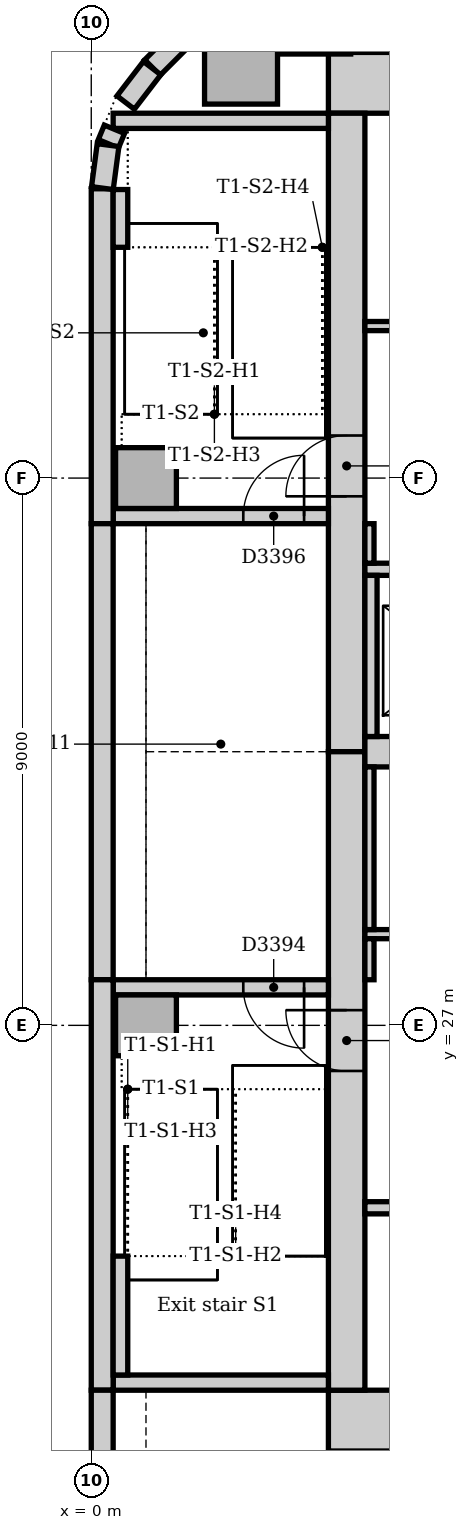
"""IFC4 building model, lengths in metres.
Left out: names, types, materials, properties, quantities, classifications, styles, units other than length and angle.
Written with IfcOpenShell. Run it as: python <this file> out.ifc"""

import sys

from ifc_helpers import new_model, si_unit, direction, frame, frame_2d, origin, origin_2d, place, context, subcontext, project, spatial, rectangle, extrude, element, fill, save


model = new_model("IFC4")
c1 = context("Model", 3, precision=1e-05, world=origin(), true_north=direction((0.0, 1.0)))
c2 = subcontext(c1, "Body", "Model", "MODEL_VIEW")
j1 = project(units=[si_unit("LENGTHUNIT", "METRE"), si_unit("PLANEANGLEUNIT", "RADIAN")], contexts=[c1])
p1 = place(None, origin())
s1 = spatial("IfcSite", under=j1, at=p1, CompositionType="ELEMENT")
p2 = place(p1, origin())
s2 = spatial("IfcBuilding", under=s1, at=p2, CompositionType="ELEMENT")
p3 = place(p2, frame((0.0, 0.0, 46.0)))
s3 = spatial("IfcBuildingStorey", under=s2, at=p3, CompositionType="ELEMENT", Elevation=46.0)
for number, where, z_axis, x_axis in (
    (1, (3.9, 20.5, 0.0), (0.0, 0.0, 1.0), (1.0, 0.0, 0.0)),
    (2, (23.5, 42.5, 0.0), (0.0, 0.0, 1.0), (-1.0, 0.0, 0.0)),
):
    element("IfcWall", number, at=place(p3, frame(where, z_axis=z_axis, x_axis=x_axis)), inside=s3, PredefinedType="SOLIDWALL", context=c2, shape_type="SweptSolid", body=[
        extrude(rectangle(XDim=19.6, YDim=1.0, at=frame_2d((9.8, 0.0))), origin(), (0.0, 0.0, 1.0), 5.0),
    ])
p4 = place(p3, frame((4.2, 42.0, 0.0), z_axis=(0.0, 0.0, 1.0), x_axis=(0.0, -1.0, 0.0)))
e3 = element("IfcWall", 3, at=p4, inside=s3, PredefinedType="SOLIDWALL", context=c2, shape_type="SweptSolid", body=[
    extrude(rectangle(XDim=10.5, YDim=0.6, at=frame_2d((5.25, 0.0))), origin(), (0.0, 0.0, 1.0), 5.0),
])
p5 = place(p4, frame((5.3, 0.0, 0.0)))
e4 = element("IfcOpeningElement", 4, at=p5, cuts=e3, PredefinedType="OPENING", context=c2, shape_type="SweptSolid", body=[
    extrude(rectangle(XDim=1.0, YDim=2.1, at=frame_2d((0.5, 1.05))), frame((0.0, 0.31, 0.0), z_axis=(0.0, -1.0, 0.0), x_axis=(1.0, 0.0, 0.0)), (0.0, 0.0, 1.0), 0.62),
])
p6 = place(p3, frame((4.2, 31.5, 0.0), z_axis=(0.0, 0.0, 1.0), x_axis=(0.0, -1.0, 0.0)))
e5 = element("IfcWall", 5, at=p6, inside=s3, PredefinedType="SOLIDWALL", context=c2, shape_type="SweptSolid", body=[
    extrude(rectangle(XDim=10.5, YDim=0.6, at=frame_2d((5.25, 0.0))), origin(), (0.0, 0.0, 1.0), 5.0),
])
p7 = place(p6, frame((4.25, 0.0, 0.0)))
e6 = element("IfcOpeningElement", 6, at=p7, cuts=e5, PredefinedType="OPENING", context=c2, shape_type="SweptSolid", body=[
    extrude(rectangle(XDim=1.0, YDim=2.1, at=frame_2d((0.5, 1.05))), frame((0.0, 0.31, 0.0), z_axis=(0.0, -1.0, 0.0), x_axis=(1.0, 0.0, 0.0)), (0.0, 0.0, 1.0), 0.62),
])
p8 = place(p3, frame((4.5, 31.5, 0.0), z_axis=(0.0, 0.0, 1.0), x_axis=(1.0, 0.0, 0.0)))
e7 = element("IfcWall", 7, at=p8, inside=s3, PredefinedType="SOLIDWALL", context=c2, shape_type="SweptSolid", body=[
    extrude(rectangle(XDim=18.0, YDim=0.5, at=frame_2d((9.0, 0.0))), origin(), (0.0, 0.0, 1.0), 5.0),
])
p9 = place(p3, frame((0.36, 21.125, 0.0), z_axis=(0.0, 0.0, 1.0), x_axis=(1.0, 0.0, 0.0)))
e8 = element("IfcWall", 8, at=p9, inside=s3, PredefinedType="SOLIDWALL", context=c2, shape_type="SweptSolid", body=[
    extrude(rectangle(XDim=3.54, YDim=0.25, at=frame_2d((1.77, 0.0))), origin(), (0.0, 0.0, 1.0), 5.0),
])
p10 = place(p3, frame((3.9, 27.625, 0.0), z_axis=(0.0, 0.0, 1.0), x_axis=(-1.0, 0.0, 0.0)))
e9 = element("IfcWall", 9, at=p10, inside=s3, PredefinedType="SOLIDWALL", context=c2, shape_type="SweptSolid", body=[
    extrude(rectangle(XDim=3.54, YDim=0.25, at=frame_2d((1.77, 0.0))), origin(), (0.0, 0.0, 1.0), 5.0),
])
p11 = place(p10, frame((0.4, 0.0, 0.0)))
e10 = element("IfcOpeningElement", 10, at=p11, cuts=e9, PredefinedType="OPENING", context=c2, shape_type="SweptSolid", body=[
    extrude(rectangle(XDim=1.0, YDim=2.1, at=frame_2d((0.5, 1.05))), frame((0.0, 0.135, 0.0), z_axis=(0.0, -1.0, 0.0), x_axis=(1.0, 0.0, 0.0)), (0.0, 0.0, 1.0), 0.27),
])
p12 = place(p3, frame((0.36, 35.375, 0.0), z_axis=(0.0, 0.0, 1.0), x_axis=(1.0, 0.0, 0.0)))
e11 = element("IfcWall", 11, at=p12, inside=s3, PredefinedType="SOLIDWALL", context=c2, shape_type="SweptSolid", body=[
    extrude(rectangle(XDim=3.54, YDim=0.25, at=frame_2d((1.77, 0.0))), origin(), (0.0, 0.0, 1.0), 5.0),
])
p13 = place(p12, frame((2.14, 0.0, 0.0)))
e12 = element("IfcOpeningElement", 12, at=p13, cuts=e11, PredefinedType="OPENING", context=c2, shape_type="SweptSolid", body=[
    extrude(rectangle(XDim=1.0, YDim=2.1, at=frame_2d((0.5, 1.05))), frame((0.0, 0.135, 0.0), z_axis=(0.0, -1.0, 0.0), x_axis=(1.0, 0.0, 0.0)), (0.0, 0.0, 1.0), 0.27),
])
p14 = place(p3, frame((3.9, 41.875, 0.0), z_axis=(0.0, 0.0, 1.0), x_axis=(-1.0, 0.0, 0.0)))
e13 = element("IfcWall", 13, at=p14, inside=s3, PredefinedType="SOLIDWALL", context=c2, shape_type="SweptSolid", body=[
    extrude(rectangle(XDim=3.54, YDim=0.25, at=frame_2d((1.77, 0.0))), origin(), (0.0, 0.0, 1.0), 5.0),
])
for number, where, z_axis, x_axis in (
    (14, (3.667, 43.574, 0.0), (0.0, 0.0, 1.0), (1.0, 0.0, 0.0)),
    (15, (2.463, 42.75, 0.0), (0.0, 0.0, 1.0), (1.0, 0.0, 0.0)),
):
    element("IfcColumn", number, at=place(p3, frame(where, z_axis=z_axis, x_axis=x_axis)), inside=s3, PredefinedType="COLUMN", context=c2, shape_type="SweptSolid", body=[
        extrude(rectangle(XDim=1.2, YDim=1.2, at=origin_2d()), origin(), (0.0, 0.0, 1.0), 4.85),
    ])
for number, where, z_axis, x_axis in (
    (16, (0.9, 27.0, 0.0), (0.0, 0.0, 1.0), (1.0, 0.0, 0.0)),
    (17, (0.9, 36.0, 0.0), (0.0, 0.0, 1.0), (1.0, 0.0, 0.0)),
):
    element("IfcColumn", number, at=place(p3, frame(where, z_axis=z_axis, x_axis=x_axis)), inside=s3, PredefinedType="COLUMN", context=c2, shape_type="SweptSolid", body=[
        extrude(rectangle(XDim=1.0, YDim=1.0, at=origin_2d()), origin(), (0.0, 0.0, 1.0), 5.0),
    ])
p15 = place(p3, frame((2.249, 43.994, 0.0), z_axis=(0.0, 0.0, 1.0), x_axis=(-0.707106781187, -0.707106781187, 0.0)))
e18 = element("IfcWall", 18, at=p15, inside=s3, PredefinedType="STANDARD", context=c2, shape_type="SweptSolid", body=[
    extrude(rectangle(XDim=1.757, YDim=0.36, at=frame_2d((0.879, 0.0))), origin(), (0.0, 0.0, 1.0), 4.85),
])
p16 = place(p3, frame((0.18, 40.757, 0.0), z_axis=(0.0, 0.0, 1.0), x_axis=(0.0, -1.0, 0.0)))
e19 = element("IfcWall", 19, at=p16, inside=s3, PredefinedType="STANDARD", context=c2, shape_type="SweptSolid", body=[
    extrude(rectangle(XDim=5.507, YDim=0.36, at=frame_2d((2.754, 0.0))), origin(), (0.0, 0.0, 1.0), 4.85),
])
p17 = place(p3, frame((0.18, 35.25, 0.0), z_axis=(0.0, 0.0, 1.0), x_axis=(0.0, -1.0, 0.0)))
e20 = element("IfcWall", 20, at=p17, inside=s3, PredefinedType="STANDARD", context=c2, shape_type="SweptSolid", body=[
    extrude(rectangle(XDim=7.5, YDim=0.36, at=frame_2d((3.75, 0.0))), origin(), (0.0, 0.0, 1.0), 4.85),
])
p18 = place(p3, frame((0.18, 27.75, 0.0), z_axis=(0.0, 0.0, 1.0), x_axis=(0.0, -1.0, 0.0)))
e21 = element("IfcWall", 21, at=p18, inside=s3, PredefinedType="STANDARD", context=c2, shape_type="SweptSolid", body=[
    extrude(rectangle(XDim=6.75, YDim=0.36, at=frame_2d((3.375, 0.0))), origin(), (0.0, 0.0, 1.0), 4.85),
])
p19 = place(p3, frame((0.18, 21.0, 0.0), z_axis=(0.0, 0.0, 1.0), x_axis=(0.0, -1.0, 0.0)))
e22 = element("IfcWall", 22, at=p19, inside=s3, PredefinedType="STANDARD", context=c2, shape_type="SweptSolid", body=[
    extrude(rectangle(XDim=16.757, YDim=0.36, at=frame_2d((8.379, 0.0))), origin(), (0.0, 0.0, 1.0), 4.85),
])
p20 = place(p19, frame((1.35, 0.0, 0.9)))
e23 = element("IfcOpeningElement", 23, at=p20, cuts=e22, PredefinedType="OPENING", context=c2, shape_type="SweptSolid", body=[
    extrude(rectangle(XDim=3.3, YDim=2.2, at=frame_2d((1.65, 1.1))), frame((0.0, 0.19, 0.0), z_axis=(0.0, -1.0, 0.0), x_axis=(1.0, 0.0, 0.0)), (0.0, 0.0, 1.0), 0.38),
])
p21 = place(p19, frame((5.85, 0.0, 0.9)))
e24 = element("IfcOpeningElement", 24, at=p21, cuts=e22, PredefinedType="OPENING", context=c2, shape_type="SweptSolid", body=[
    extrude(rectangle(XDim=3.3, YDim=2.2, at=frame_2d((1.65, 1.1))), frame((0.0, 0.19, 0.0), z_axis=(0.0, -1.0, 0.0), x_axis=(1.0, 0.0, 0.0)), (0.0, 0.0, 1.0), 0.38),
])
p22 = place(p19, frame((10.35, 0.0, 0.9)))
e25 = element("IfcOpeningElement", 25, at=p22, cuts=e22, PredefinedType="OPENING", context=c2, shape_type="SweptSolid", body=[
    extrude(rectangle(XDim=3.3, YDim=2.2, at=frame_2d((1.65, 1.1))), frame((0.0, 0.19, 0.0), z_axis=(0.0, -1.0, 0.0), x_axis=(1.0, 0.0, 0.0)), (0.0, 0.0, 1.0), 0.38),
])
p23 = place(p3, frame((1.0, 42.741, 0.0), z_axis=(0.0, 0.0, 1.0), x_axis=(-0.608802368033, -0.793321924995, 0.0)))
e26 = element("IfcWall", 26, at=p23, inside=s3, PredefinedType="STANDARD", context=c2, shape_type="SweptSolid", body=[
    extrude(rectangle(XDim=0.713, YDim=0.36, at=frame_2d((0.357, 0.0))), origin(), (0.0, 0.0, 1.0), 4.85),
])
p24 = place(p3, frame((0.381, 41.736, 0.0), z_axis=(0.0, 0.0, 1.0), x_axis=(-0.382773360986, -0.923842277729, 0.0)))
e27 = element("IfcWall", 27, at=p24, inside=s3, PredefinedType="STANDARD", context=c2, shape_type="SweptSolid", body=[
    extrude(rectangle(XDim=0.258, YDim=0.36, at=frame_2d((0.129, 0.0))), origin(), (0.0, 0.0, 1.0), 4.85),
])
p25 = place(p3, frame((0.276, 41.476, 0.0), z_axis=(0.0, 0.0, 1.0), x_axis=(-0.13055608231, -0.99144092581, 0.0)))
e28 = element("IfcWall", 28, at=p25, inside=s3, PredefinedType="STANDARD", context=c2, shape_type="SweptSolid", body=[
    extrude(rectangle(XDim=0.713, YDim=0.36, at=frame_2d((0.356, 0.0))), origin(), (0.0, 0.0, 1.0), 4.85),
])
p26 = place(p3, frame((0.48, 21.25, 0.0), z_axis=(0.0, 0.0, 1.0), x_axis=(0.0, 1.0, 0.0)))
e29 = element("IfcWall", 29, at=p26, inside=s3, PredefinedType="STANDARD", context=c2, shape_type="SweptSolid", body=[
    extrude(rectangle(XDim=1.955, YDim=0.24, at=frame_2d((0.978, 0.0))), origin(), (0.0, 0.0, 1.0), 5.0),
])
p27 = place(p3, frame((0.48, 39.795, 0.0), z_axis=(0.0, 0.0, 1.0), x_axis=(0.0, 1.0, 0.0)))
e30 = element("IfcWall", 30, at=p27, inside=s3, PredefinedType="STANDARD", context=c2, shape_type="SweptSolid", body=[
    extrude(rectangle(XDim=0.95, YDim=0.24, at=frame_2d((0.475, 0.0))), origin(), (0.0, 0.0, 1.0), 5.0),
])
p28 = place(p3, frame((4.5, 24.0, 0.0), z_axis=(0.0, 0.0, 1.0), x_axis=(1.0, 0.0, 0.0)))
e31 = element("IfcWall", 31, at=p28, inside=s3, PredefinedType="PARTITIONING", context=c2, shape_type="SweptSolid", body=[
    extrude(rectangle(XDim=18.0, YDim=0.2, at=frame_2d((9.0, 0.0))), origin(), (0.0, 0.0, 1.0), 4.85),
])
p29 = place(p28, frame((0.95, 0.0, 0.0)))
e32 = element("IfcOpeningElement", 32, at=p29, cuts=e31, PredefinedType="OPENING", context=c2, shape_type="SweptSolid", body=[
    extrude(rectangle(XDim=1.1, YDim=2.1, at=frame_2d((0.55, 1.05))), frame((0.0, 0.11, 0.0), z_axis=(0.0, -1.0, 0.0), x_axis=(1.0, 0.0, 0.0)), (0.0, 0.0, 1.0), 0.22),
])
p30 = place(p28, frame((3.95, 0.0, 0.0)))
e33 = element("IfcOpeningElement", 33, at=p30, cuts=e31, PredefinedType="OPENING", context=c2, shape_type="SweptSolid", body=[
    extrude(rectangle(XDim=1.1, YDim=2.1, at=frame_2d((0.55, 1.05))), frame((0.0, 0.11, 0.0), z_axis=(0.0, -1.0, 0.0), x_axis=(1.0, 0.0, 0.0)), (0.0, 0.0, 1.0), 0.22),
])
p31 = place(p28, frame((6.95, 0.0, 0.0)))
e34 = element("IfcOpeningElement", 34, at=p31, cuts=e31, PredefinedType="OPENING", context=c2, shape_type="SweptSolid", body=[
    extrude(rectangle(XDim=1.1, YDim=2.1, at=frame_2d((0.55, 1.05))), frame((0.0, 0.11, 0.0), z_axis=(0.0, -1.0, 0.0), x_axis=(1.0, 0.0, 0.0)), (0.0, 0.0, 1.0), 0.22),
])
p32 = place(p28, frame((9.95, 0.0, 0.0)))
e35 = element("IfcOpeningElement", 35, at=p32, cuts=e31, PredefinedType="OPENING", context=c2, shape_type="SweptSolid", body=[
    extrude(rectangle(XDim=1.1, YDim=2.1, at=frame_2d((0.55, 1.05))), frame((0.0, 0.11, 0.0), z_axis=(0.0, -1.0, 0.0), x_axis=(1.0, 0.0, 0.0)), (0.0, 0.0, 1.0), 0.22),
])
p33 = place(p28, frame((12.95, 0.0, 0.0)))
e36 = element("IfcOpeningElement", 36, at=p33, cuts=e31, PredefinedType="OPENING", context=c2, shape_type="SweptSolid", body=[
    extrude(rectangle(XDim=1.1, YDim=2.1, at=frame_2d((0.55, 1.05))), frame((0.0, 0.11, 0.0), z_axis=(0.0, -1.0, 0.0), x_axis=(1.0, 0.0, 0.0)), (0.0, 0.0, 1.0), 0.22),
])
p34 = place(p28, frame((15.95, 0.0, 0.0)))
e37 = element("IfcOpeningElement", 37, at=p34, cuts=e31, PredefinedType="OPENING", context=c2, shape_type="SweptSolid", body=[
    extrude(rectangle(XDim=1.1, YDim=2.1, at=frame_2d((0.55, 1.05))), frame((0.0, 0.11, 0.0), z_axis=(0.0, -1.0, 0.0), x_axis=(1.0, 0.0, 0.0)), (0.0, 0.0, 1.0), 0.22),
])
p35 = place(p3, frame((4.5, 34.5, 0.0), z_axis=(0.0, 0.0, 1.0), x_axis=(1.0, 0.0, 0.0)))
e38 = element("IfcWall", 38, at=p35, inside=s3, PredefinedType="PARTITIONING", context=c2, shape_type="SweptSolid", body=[
    extrude(rectangle(XDim=18.0, YDim=0.2, at=frame_2d((9.0, 0.0))), origin(), (0.0, 0.0, 1.0), 4.85),
])
p36 = place(p35, frame((0.95, 0.0, 0.0)))
e39 = element("IfcOpeningElement", 39, at=p36, cuts=e38, PredefinedType="OPENING", context=c2, shape_type="SweptSolid", body=[
    extrude(rectangle(XDim=1.1, YDim=2.1, at=frame_2d((0.55, 1.05))), frame((0.0, 0.11, 0.0), z_axis=(0.0, -1.0, 0.0), x_axis=(1.0, 0.0, 0.0)), (0.0, 0.0, 1.0), 0.22),
])
p37 = place(p35, frame((3.95, 0.0, 0.0)))
e40 = element("IfcOpeningElement", 40, at=p37, cuts=e38, PredefinedType="OPENING", context=c2, shape_type="SweptSolid", body=[
    extrude(rectangle(XDim=1.1, YDim=2.1, at=frame_2d((0.55, 1.05))), frame((0.0, 0.11, 0.0), z_axis=(0.0, -1.0, 0.0), x_axis=(1.0, 0.0, 0.0)), (0.0, 0.0, 1.0), 0.22),
])
p38 = place(p35, frame((12.95, 0.0, 0.0)))
e41 = element("IfcOpeningElement", 41, at=p38, cuts=e38, PredefinedType="OPENING", context=c2, shape_type="SweptSolid", body=[
    extrude(rectangle(XDim=1.1, YDim=2.1, at=frame_2d((0.55, 1.05))), frame((0.0, 0.11, 0.0), z_axis=(0.0, -1.0, 0.0), x_axis=(1.0, 0.0, 0.0)), (0.0, 0.0, 1.0), 0.22),
])
p39 = place(p35, frame((15.95, 0.0, 0.0)))
e42 = element("IfcOpeningElement", 42, at=p39, cuts=e38, PredefinedType="OPENING", context=c2, shape_type="SweptSolid", body=[
    extrude(rectangle(XDim=1.1, YDim=2.1, at=frame_2d((0.55, 1.05))), frame((0.0, 0.11, 0.0), z_axis=(0.0, -1.0, 0.0), x_axis=(1.0, 0.0, 0.0)), (0.0, 0.0, 1.0), 0.22),
])
p40 = place(p3, frame((4.6, 31.75, 0.0), z_axis=(0.0, 0.0, 1.0), x_axis=(0.0, 1.0, 0.0)))
e43 = element("IfcWall", 43, at=p40, inside=s3, PredefinedType="PARTITIONING", context=c2, shape_type="SweptSolid", body=[
    extrude(rectangle(XDim=2.65, YDim=0.2, at=frame_2d((1.325, 0.0))), origin(), (0.0, 0.0, 1.0), 4.85),
])
p41 = place(p3, frame((4.5, 28.5, 0.0), z_axis=(0.0, 0.0, 1.0), x_axis=(1.0, 0.0, 0.0)))
e44 = element("IfcWall", 44, at=p41, inside=s3, PredefinedType="PARTITIONING", context=c2, shape_type="SweptSolid", body=[
    extrude(rectangle(XDim=18.0, YDim=0.15, at=frame_2d((9.0, 0.0))), origin(), (0.0, 0.0, 1.0), 4.85),
])
p42 = place(p41, frame((1.1, 0.0, 0.0)))
e45 = element("IfcOpeningElement", 45, at=p42, cuts=e44, PredefinedType="OPENING", context=c2, shape_type="SweptSolid", body=[
    extrude(rectangle(XDim=0.9, YDim=2.1, at=frame_2d((0.45, 1.05))), frame((0.0, 0.085, 0.0), z_axis=(0.0, -1.0, 0.0), x_axis=(1.0, 0.0, 0.0)), (0.0, 0.0, 1.0), 0.17),
])
p43 = place(p41, frame((7.05, 0.0, 0.0)))
e46 = element("IfcOpeningElement", 46, at=p43, cuts=e44, PredefinedType="OPENING", context=c2, shape_type="SweptSolid", body=[
    extrude(rectangle(XDim=0.9, YDim=2.1, at=frame_2d((0.45, 1.05))), frame((0.0, 0.085, 0.0), z_axis=(0.0, -1.0, 0.0), x_axis=(1.0, 0.0, 0.0)), (0.0, 0.0, 1.0), 0.17),
])
p44 = place(p41, frame((14.45, 0.0, 0.0)))
e47 = element("IfcOpeningElement", 47, at=p44, cuts=e44, PredefinedType="OPENING", context=c2, shape_type="SweptSolid", body=[
    extrude(rectangle(XDim=0.9, YDim=2.1, at=frame_2d((0.45, 1.05))), frame((0.0, 0.085, 0.0), z_axis=(0.0, -1.0, 0.0), x_axis=(1.0, 0.0, 0.0)), (0.0, 0.0, 1.0), 0.17),
])
p45 = place(p3, frame((4.5, 38.5, 0.0), z_axis=(0.0, 0.0, 1.0), x_axis=(1.0, 0.0, 0.0)))
e48 = element("IfcWall", 48, at=p45, inside=s3, PredefinedType="PARTITIONING", context=c2, shape_type="SweptSolid", body=[
    extrude(rectangle(XDim=11.9, YDim=0.15, at=frame_2d((5.95, 0.0))), origin(), (0.0, 0.0, 1.0), 4.85),
])
p46 = place(p45, frame((1.1, 0.0, 0.0)))
e49 = element("IfcOpeningElement", 49, at=p46, cuts=e48, PredefinedType="OPENING", context=c2, shape_type="SweptSolid", body=[
    extrude(rectangle(XDim=0.9, YDim=2.1, at=frame_2d((0.45, 1.05))), frame((0.0, 0.085, 0.0), z_axis=(0.0, -1.0, 0.0), x_axis=(1.0, 0.0, 0.0)), (0.0, 0.0, 1.0), 0.17),
])
p47 = place(p45, frame((4.8, 0.0, 0.0)))
e50 = element("IfcOpeningElement", 50, at=p47, cuts=e48, PredefinedType="OPENING", context=c2, shape_type="SweptSolid", body=[
    extrude(rectangle(XDim=0.9, YDim=2.1, at=frame_2d((0.45, 1.05))), frame((0.0, 0.085, 0.0), z_axis=(0.0, -1.0, 0.0), x_axis=(1.0, 0.0, 0.0)), (0.0, 0.0, 1.0), 0.17),
])
p48 = place(p45, frame((7.8, 0.0, 0.0)))
e51 = element("IfcOpeningElement", 51, at=p48, cuts=e48, PredefinedType="OPENING", context=c2, shape_type="SweptSolid", body=[
    extrude(rectangle(XDim=0.9, YDim=2.1, at=frame_2d((0.45, 1.05))), frame((0.0, 0.085, 0.0), z_axis=(0.0, -1.0, 0.0), x_axis=(1.0, 0.0, 0.0)), (0.0, 0.0, 1.0), 0.17),
])
p49 = place(p45, frame((9.95, 0.0, 0.0)))
e52 = element("IfcOpeningElement", 52, at=p49, cuts=e48, PredefinedType="OPENING", context=c2, shape_type="SweptSolid", body=[
    extrude(rectangle(XDim=0.8, YDim=2.1, at=frame_2d((0.4, 1.05))), frame((0.0, 0.085, 0.0), z_axis=(0.0, -1.0, 0.0), x_axis=(1.0, 0.0, 0.0)), (0.0, 0.0, 1.0), 0.17),
])
p50 = place(p3, frame((4.575, 27.75, 0.0), z_axis=(0.0, 0.0, 1.0), x_axis=(0.0, 1.0, 0.0)))
e53 = element("IfcWall", 53, at=p50, inside=s3, PredefinedType="PARTITIONING", context=c2, shape_type="SweptSolid", body=[
    extrude(rectangle(XDim=0.675, YDim=0.15, at=frame_2d((0.338, 0.0))), origin(), (0.0, 0.0, 1.0), 4.85),
])
p51 = place(p3, frame((4.575, 28.575, 0.0), z_axis=(0.0, 0.0, 1.0), x_axis=(0.0, 1.0, 0.0)))
e54 = element("IfcWall", 54, at=p51, inside=s3, PredefinedType="PARTITIONING", context=c2, shape_type="SweptSolid", body=[
    extrude(rectangle(XDim=2.675, YDim=0.15, at=frame_2d((1.337, 0.0))), origin(), (0.0, 0.0, 1.0), 4.85),
])
p52 = place(p3, frame((4.575, 34.6, 0.0), z_axis=(0.0, 0.0, 1.0), x_axis=(0.0, 1.0, 0.0)))
e55 = element("IfcWall", 55, at=p52, inside=s3, PredefinedType="PARTITIONING", context=c2, shape_type="SweptSolid", body=[
    extrude(rectangle(XDim=0.65, YDim=0.15, at=frame_2d((0.325, 0.0))), origin(), (0.0, 0.0, 1.0), 4.85),
])
p53 = place(p7, frame((1.0, 0.0, 0.0), z_axis=(0.0, 0.0, 1.0), x_axis=(-1.0, 0.0, 0.0)))
e56 = element("IfcDoor", 56, at=p53, inside=s3, OperationType="SINGLE_SWING_RIGHT", PredefinedType="DOOR", context=c2, shape_type="SweptSolid", body=[
    extrude(rectangle(XDim=1.0, YDim=2.1, at=frame_2d((0.5, 1.05))), frame((0.0, 0.025, 0.0), z_axis=(0.0, -1.0, 0.0), x_axis=(1.0, 0.0, 0.0)), (0.0, 0.0, 1.0), 0.05),
])
fill(e6, e56)
p54 = place(p11, origin())
e57 = element("IfcDoor", 57, at=p54, inside=s3, OperationType="SINGLE_SWING_LEFT", PredefinedType="DOOR", context=c2, shape_type="SweptSolid", body=[
    extrude(rectangle(XDim=1.0, YDim=2.1, at=frame_2d((0.5, 1.05))), frame((0.0, 0.025, 0.0), z_axis=(0.0, -1.0, 0.0), x_axis=(1.0, 0.0, 0.0)), (0.0, 0.0, 1.0), 0.05),
])
fill(e10, e57)
p55 = place(p5, frame((1.0, 0.0, 0.0), z_axis=(0.0, 0.0, 1.0), x_axis=(-1.0, 0.0, 0.0)))
e58 = element("IfcDoor", 58, at=p55, inside=s3, OperationType="SINGLE_SWING_LEFT", PredefinedType="DOOR", context=c2, shape_type="SweptSolid", body=[
    extrude(rectangle(XDim=1.0, YDim=2.1, at=frame_2d((0.5, 1.05))), frame((0.0, 0.025, 0.0), z_axis=(0.0, -1.0, 0.0), x_axis=(1.0, 0.0, 0.0)), (0.0, 0.0, 1.0), 0.05),
])
fill(e4, e58)
p56 = place(p13, origin())
e59 = element("IfcDoor", 59, at=p56, inside=s3, OperationType="SINGLE_SWING_RIGHT", PredefinedType="DOOR", context=c2, shape_type="SweptSolid", body=[
    extrude(rectangle(XDim=1.0, YDim=2.1, at=frame_2d((0.5, 1.05))), frame((0.0, 0.025, 0.0), z_axis=(0.0, -1.0, 0.0), x_axis=(1.0, 0.0, 0.0)), (0.0, 0.0, 1.0), 0.05),
])
fill(e12, e59)
save(model, sys.argv[1])
